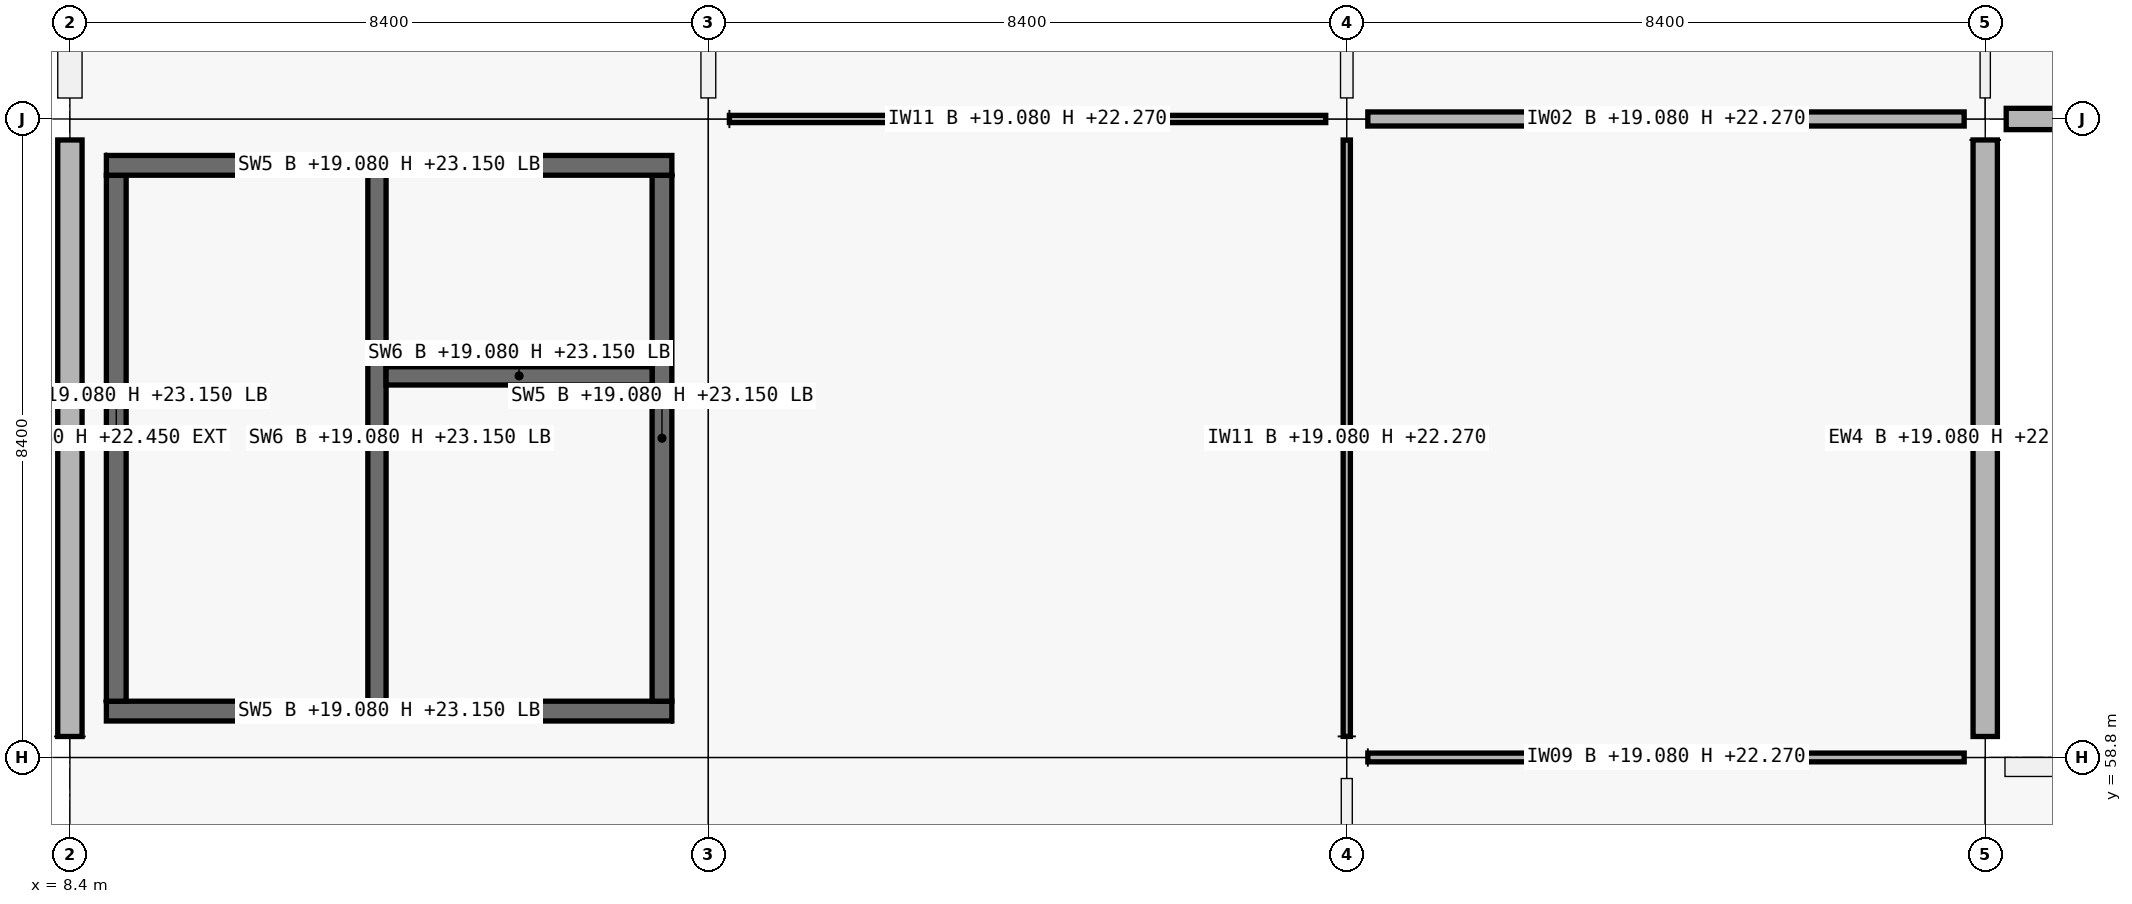
"""IFC4 building model, lengths in metres.
Left out: names, types, materials, properties, quantities, classifications, styles, units other than length and angle.
Written with IfcOpenShell. Run it as: python <this file> out.ifc"""

import sys

from ifc_helpers import new_model, si_unit, direction, frame, frame_2d, origin, origin_2d, place, context, subcontext, project, spatial, rectangle, i_section, extrude, element, fill, save


model = new_model("IFC4")
c1 = context("Model", 3, precision=1e-05, world=origin(), true_north=direction((0.0, 1.0)))
c2 = subcontext(c1, "Body", "Model", "MODEL_VIEW")
j1 = project(units=[si_unit("LENGTHUNIT", "METRE"), si_unit("PLANEANGLEUNIT", "RADIAN")], contexts=[c1])
p1 = place(None, origin())
s1 = spatial("IfcSite", under=j1, at=p1, CompositionType="ELEMENT")
p2 = place(p1, origin())
s2 = spatial("IfcBuilding", under=s1, at=p2, CompositionType="ELEMENT")
p3 = place(p2, frame((0.0, 0.0, 19.08)))
s3 = spatial("IfcBuildingStorey", under=s2, at=p3, CompositionType="ELEMENT", Elevation=19.08)
for number, where, z_axis, x_axis in (
    (1, (8.4, 58.8, 0.0), (0.0, 0.0, 1.0), (1.0, 0.0, 0.0)),
    (2, (8.4, 67.2, 0.0), (0.0, 0.0, 1.0), (1.0, 0.0, 0.0)),
    (3, (16.8, 58.8, 0.0), (0.0, 0.0, 1.0), (1.0, 0.0, 0.0)),
    (4, (16.8, 67.2, 0.0), (0.0, 0.0, 1.0), (1.0, 0.0, 0.0)),
    (5, (25.2, 58.8, 0.0), (0.0, 0.0, 1.0), (1.0, 0.0, 0.0)),
    (6, (25.2, 67.2, 0.0), (0.0, 0.0, 1.0), (1.0, 0.0, 0.0)),
    (7, (33.6, 58.8, 0.0), (0.0, 0.0, 1.0), (1.0, 0.0, 0.0)),
    (8, (33.6, 67.2, 0.0), (0.0, 0.0, 1.0), (1.0, 0.0, 0.0)),
):
    element("IfcColumn", number, at=place(p3, frame(where, z_axis=z_axis, x_axis=x_axis)), inside=s3, PredefinedType="COLUMN", context=c2, shape_type="SweptSolid", body=[
        extrude(rectangle(XDim=0.55, YDim=0.55, at=origin_2d()), origin(), (0.0, 0.0, 1.0), 4.16),
    ])
for number, where, z_axis, x_axis in (
    (9, (16.8, 58.8, 4.16), (0.0, 0.0, 1.0), (1.0, 0.0, 0.0)),
    (10, (25.2, 58.8, 4.16), (0.0, 0.0, 1.0), (1.0, 0.0, 0.0)),
    (11, (16.8, 67.2, 4.16), (0.0, 0.0, 1.0), (1.0, 0.0, 0.0)),
    (12, (25.2, 67.2, 4.16), (0.0, 0.0, 1.0), (1.0, 0.0, 0.0)),
):
    element("IfcColumn", number, at=place(p3, frame(where, z_axis=z_axis, x_axis=x_axis)), inside=s3, PredefinedType="COLUMN", context=c2, shape_type="SweptSolid", body=[
        extrude(i_section(OverallWidth=0.305, OverallDepth=0.308, WebThickness=0.01, FlangeThickness=0.015, FilletRadius=0.017, at=origin_2d()), origin(), (0.0, 0.0, 1.0), 1.925),
    ])
p4 = place(p3, frame((8.4, 59.076, 0.0), z_axis=(0.0, 0.0, 1.0), x_axis=(0.0, 1.0, 0.0)))
e13 = element("IfcWall", 13, at=p4, inside=s3, PredefinedType="SOLIDWALL", context=c2, shape_type="SweptSolid", body=[
    extrude(rectangle(XDim=7.848, YDim=0.32, at=frame_2d((3.924, 0.0))), origin(), (0.0, 0.0, 1.0), 3.37),
])
p5 = place(p3, frame((8.4, 67.476, 0.0), z_axis=(0.0, 0.0, 1.0), x_axis=(0.0, 1.0, 0.0)))
e14 = element("IfcWall", 14, at=p5, inside=s3, PredefinedType="SOLIDWALL", context=c2, shape_type="SweptSolid", body=[
    extrude(rectangle(XDim=7.848, YDim=0.32, at=frame_2d((3.924, 0.0))), origin(), (0.0, 0.0, 1.0), 3.37),
])
p6 = place(p3, frame((33.6, 66.924, 0.0), z_axis=(0.0, 0.0, 1.0), x_axis=(0.0, -1.0, 0.0)))
e15 = element("IfcWall", 15, at=p6, inside=s3, PredefinedType="SOLIDWALL", context=c2, shape_type="SweptSolid", body=[
    extrude(rectangle(XDim=7.848, YDim=0.32, at=frame_2d((3.924, 0.0))), origin(), (0.0, 0.0, 1.0), 3.37),
])
p7 = place(p6, frame((3.474, 0.0, 0.9)))
e16 = element("IfcOpeningElement", 16, at=p7, cuts=e15, PredefinedType="OPENING", context=c2, shape_type="SweptSolid", body=[
    extrude(rectangle(XDim=0.9, YDim=1.5, at=frame_2d((0.45, 0.75))), frame((0.0, 0.16, 0.0), z_axis=(0.0, -1.0, 0.0), x_axis=(1.0, 0.0, 0.0)), (0.0, 0.0, 1.0), 0.32),
])
p8 = place(p3, frame((41.724, 67.2, 0.0), z_axis=(0.0, 0.0, 1.0), x_axis=(-1.0, 0.0, 0.0)))
e17 = element("IfcWall", 17, at=p8, inside=s3, PredefinedType="SOLIDWALL", context=c2, shape_type="SweptSolid", body=[
    extrude(rectangle(XDim=7.848, YDim=0.28, at=frame_2d((3.924, 0.0))), origin(), (0.0, 0.0, 1.0), 3.37),
])
p9 = place(p8, frame((2.774, 0.0, 0.9)))
e18 = element("IfcOpeningElement", 18, at=p9, cuts=e17, PredefinedType="OPENING", context=c2, shape_type="SweptSolid", body=[
    extrude(rectangle(XDim=2.3, YDim=1.85, at=frame_2d((1.15, 0.925))), frame((0.0, 0.14, 0.0), z_axis=(0.0, -1.0, 0.0), x_axis=(1.0, 0.0, 0.0)), (0.0, 0.0, 1.0), 0.28),
])
p10 = place(p3, frame((33.86, 58.675, 0.0), z_axis=(0.0, 0.0, 1.0), x_axis=(1.0, 0.0, 0.0)))
e19 = element("IfcWall", 19, at=p10, inside=s3, PredefinedType="PARAPET", context=c2, shape_type="SweptSolid", body=[
    extrude(rectangle(XDim=7.88, YDim=0.25, at=frame_2d((3.94, 0.0))), origin(), (0.0, 0.0, 1.0), 0.95),
])
p11 = place(p3, frame((16.32, 59.41, 0.0), z_axis=(0.0, 0.0, 1.0), x_axis=(-1.0, 0.0, 0.0)))
e20 = element("IfcWall", 20, at=p11, inside=s3, PredefinedType="SHEAR", context=c2, shape_type="SweptSolid", body=[
    extrude(rectangle(XDim=7.44, YDim=0.26, at=frame_2d((3.72, 0.0))), origin(), (0.0, 0.0, 1.0), 4.07),
])
p12 = place(p11, frame((1.28, 0.0, 0.0)))
e21 = element("IfcOpeningElement", 21, at=p12, cuts=e20, PredefinedType="OPENING", context=c2, shape_type="SweptSolid", body=[
    extrude(rectangle(XDim=1.5, YDim=2.15, at=frame_2d((0.75, 1.075))), frame((0.0, 0.13, 0.0), z_axis=(0.0, -1.0, 0.0), x_axis=(1.0, 0.0, 0.0)), (0.0, 0.0, 1.0), 0.26),
])
p13 = place(p3, frame((9.01, 59.54, 0.0), z_axis=(0.0, 0.0, 1.0), x_axis=(0.0, 1.0, 0.0)))
e22 = element("IfcWall", 22, at=p13, inside=s3, PredefinedType="SHEAR", context=c2, shape_type="SweptSolid", body=[
    extrude(rectangle(XDim=6.92, YDim=0.26, at=frame_2d((3.46, 0.0))), origin(), (0.0, 0.0, 1.0), 4.07),
])
p14 = place(p3, frame((8.88, 66.59, 0.0), z_axis=(0.0, 0.0, 1.0), x_axis=(1.0, 0.0, 0.0)))
e23 = element("IfcWall", 23, at=p14, inside=s3, PredefinedType="SHEAR", context=c2, shape_type="SweptSolid", body=[
    extrude(rectangle(XDim=7.44, YDim=0.26, at=frame_2d((3.72, 0.0))), origin(), (0.0, 0.0, 1.0), 4.07),
])
p15 = place(p3, frame((16.19, 66.46, 0.0), z_axis=(0.0, 0.0, 1.0), x_axis=(0.0, -1.0, 0.0)))
e24 = element("IfcWall", 24, at=p15, inside=s3, PredefinedType="SHEAR", context=c2, shape_type="SweptSolid", body=[
    extrude(rectangle(XDim=6.92, YDim=0.26, at=frame_2d((3.46, 0.0))), origin(), (0.0, 0.0, 1.0), 4.07),
])
p16 = place(p3, frame((12.44, 59.54, 0.0), z_axis=(0.0, 0.0, 1.0), x_axis=(0.0, 1.0, 0.0)))
e25 = element("IfcWall", 25, at=p16, inside=s3, PredefinedType="SHEAR", context=c2, shape_type="SweptSolid", body=[
    extrude(rectangle(XDim=6.92, YDim=0.24, at=frame_2d((3.46, 0.0))), origin(), (0.0, 0.0, 1.0), 4.07),
])
p17 = place(p16, frame((0.12, 0.0, 0.0)))
e26 = element("IfcOpeningElement", 26, at=p17, cuts=e25, PredefinedType="OPENING", context=c2, shape_type="SweptSolid", body=[
    extrude(rectangle(XDim=1.0, YDim=2.15, at=frame_2d((0.5, 1.075))), frame((0.0, 0.12, 0.0), z_axis=(0.0, -1.0, 0.0), x_axis=(1.0, 0.0, 0.0)), (0.0, 0.0, 1.0), 0.24),
])
p18 = place(p3, frame((12.56, 63.82, 0.0), z_axis=(0.0, 0.0, 1.0), x_axis=(1.0, 0.0, 0.0)))
e27 = element("IfcWall", 27, at=p18, inside=s3, PredefinedType="SHEAR", context=c2, shape_type="SweptSolid", body=[
    extrude(rectangle(XDim=3.5, YDim=0.24, at=frame_2d((1.75, 0.0))), origin(), (0.0, 0.0, 1.0), 4.07),
])
p19 = place(p18, frame((1.2, 0.0, 0.0)))
e28 = element("IfcOpeningElement", 28, at=p19, cuts=e27, PredefinedType="OPENING", context=c2, shape_type="SweptSolid", body=[
    extrude(rectangle(XDim=1.1, YDim=2.15, at=frame_2d((0.55, 1.075))), frame((0.0, 0.12, 0.0), z_axis=(0.0, -1.0, 0.0), x_axis=(1.0, 0.0, 0.0)), (0.0, 0.0, 1.0), 0.24),
])
p20 = place(p3, frame((17.077, 67.2, 0.0), z_axis=(0.0, 0.0, 1.0), x_axis=(1.0, 0.0, 0.0)))
e29 = element("IfcWall", 29, at=p20, inside=s3, PredefinedType="PARTITIONING", context=c2, shape_type="SweptSolid", body=[
    extrude(rectangle(XDim=7.846, YDim=0.095, at=frame_2d((3.923, 0.0))), origin(), (0.0, 0.0, 1.0), 3.19),
])
p21 = place(p20, frame((3.458, 0.0, 0.0)))
e30 = element("IfcOpeningElement", 30, at=p21, cuts=e29, PredefinedType="OPENING", context=c2, shape_type="SweptSolid", body=[
    extrude(rectangle(XDim=0.93, YDim=2.12, at=frame_2d((0.465, 1.06))), frame((0.0, 0.047, 0.0), z_axis=(0.0, -1.0, 0.0), x_axis=(1.0, 0.0, 0.0)), (0.0, 0.0, 1.0), 0.095),
])
p22 = place(p3, frame((25.477, 58.8, 0.0), z_axis=(0.0, 0.0, 1.0), x_axis=(1.0, 0.0, 0.0)))
e31 = element("IfcWall", 31, at=p22, inside=s3, PredefinedType="PARTITIONING", context=c2, shape_type="SweptSolid", body=[
    extrude(rectangle(XDim=7.846, YDim=0.115, at=frame_2d((3.923, 0.0))), origin(), (0.0, 0.0, 1.0), 3.19),
])
p23 = place(p22, frame((3.443, 0.0, 0.0)))
e32 = element("IfcOpeningElement", 32, at=p23, cuts=e31, PredefinedType="OPENING", context=c2, shape_type="SweptSolid", body=[
    extrude(rectangle(XDim=0.96, YDim=2.18, at=frame_2d((0.48, 1.09))), frame((0.0, 0.058, 0.0), z_axis=(0.0, -1.0, 0.0), x_axis=(1.0, 0.0, 0.0)), (0.0, 0.0, 1.0), 0.115),
])
p24 = place(p3, frame((25.477, 67.2, 0.0), z_axis=(0.0, 0.0, 1.0), x_axis=(1.0, 0.0, 0.0)))
e33 = element("IfcWall", 33, at=p24, inside=s3, PredefinedType="PARTITIONING", context=c2, shape_type="SweptSolid", body=[
    extrude(rectangle(XDim=7.846, YDim=0.185, at=frame_2d((3.923, 0.0))), origin(), (0.0, 0.0, 1.0), 3.19),
])
p25 = place(p24, frame((3.453, 0.0, 0.0)))
e34 = element("IfcOpeningElement", 34, at=p25, cuts=e33, PredefinedType="OPENING", context=c2, shape_type="SweptSolid", body=[
    extrude(rectangle(XDim=0.94, YDim=2.15, at=frame_2d((0.47, 1.075))), frame((0.0, 0.093, 0.0), z_axis=(0.0, -1.0, 0.0), x_axis=(1.0, 0.0, 0.0)), (0.0, 0.0, 1.0), 0.185),
])
p26 = place(p3, frame((16.8, 67.477, 0.0), z_axis=(0.0, 0.0, 1.0), x_axis=(0.0, 1.0, 0.0)))
e35 = element("IfcWall", 35, at=p26, inside=s3, PredefinedType="PARTITIONING", context=c2, shape_type="SweptSolid", body=[
    extrude(rectangle(XDim=7.846, YDim=0.195, at=frame_2d((3.923, 0.0))), origin(), (0.0, 0.0, 1.0), 3.19),
])
p27 = place(p26, frame((3.403, 0.0, 0.0)))
e36 = element("IfcOpeningElement", 36, at=p27, cuts=e35, PredefinedType="OPENING", context=c2, shape_type="SweptSolid", body=[
    extrude(rectangle(XDim=1.04, YDim=2.2, at=frame_2d((0.52, 1.1))), frame((0.0, 0.098, 0.0), z_axis=(0.0, -1.0, 0.0), x_axis=(1.0, 0.0, 0.0)), (0.0, 0.0, 1.0), 0.195),
])
p28 = place(p3, frame((25.2, 50.677, 0.0), z_axis=(0.0, 0.0, 1.0), x_axis=(0.0, 1.0, 0.0)))
e37 = element("IfcWall", 37, at=p28, inside=s3, PredefinedType="PARTITIONING", context=c2, shape_type="SweptSolid", body=[
    extrude(rectangle(XDim=7.846, YDim=0.145, at=frame_2d((3.923, 0.0))), origin(), (0.0, 0.0, 1.0), 3.19),
])
p29 = place(p28, frame((3.423, 0.0, 0.0)))
e38 = element("IfcOpeningElement", 38, at=p29, cuts=e37, PredefinedType="OPENING", context=c2, shape_type="SweptSolid", body=[
    extrude(rectangle(XDim=1.0, YDim=2.2, at=frame_2d((0.5, 1.1))), frame((0.0, 0.073, 0.0), z_axis=(0.0, -1.0, 0.0), x_axis=(1.0, 0.0, 0.0)), (0.0, 0.0, 1.0), 0.145),
])
p30 = place(p3, frame((25.2, 59.077, 0.0), z_axis=(0.0, 0.0, 1.0), x_axis=(0.0, 1.0, 0.0)))
e39 = element("IfcWall", 39, at=p30, inside=s3, PredefinedType="PARTITIONING", context=c2, shape_type="SweptSolid", body=[
    extrude(rectangle(XDim=7.846, YDim=0.095, at=frame_2d((3.923, 0.0))), origin(), (0.0, 0.0, 1.0), 3.19),
])
p31 = place(p30, frame((3.433, 0.0, 0.0)))
e40 = element("IfcOpeningElement", 40, at=p31, cuts=e39, PredefinedType="OPENING", context=c2, shape_type="SweptSolid", body=[
    extrude(rectangle(XDim=0.98, YDim=2.18, at=frame_2d((0.49, 1.09))), frame((0.0, 0.047, 0.0), z_axis=(0.0, -1.0, 0.0), x_axis=(1.0, 0.0, 0.0)), (0.0, 0.0, 1.0), 0.095),
])
p32 = place(p3, frame((25.2, 67.477, 0.0), z_axis=(0.0, 0.0, 1.0), x_axis=(0.0, 1.0, 0.0)))
e41 = element("IfcWall", 41, at=p32, inside=s3, PredefinedType="PARTITIONING", context=c2, shape_type="SweptSolid", body=[
    extrude(rectangle(XDim=7.846, YDim=0.165, at=frame_2d((3.923, 0.0))), origin(), (0.0, 0.0, 1.0), 3.19),
])
p33 = place(p32, frame((3.438, 0.0, 0.0)))
e42 = element("IfcOpeningElement", 42, at=p33, cuts=e41, PredefinedType="OPENING", context=c2, shape_type="SweptSolid", body=[
    extrude(rectangle(XDim=0.97, YDim=2.12, at=frame_2d((0.485, 1.06))), frame((0.0, 0.083, 0.0), z_axis=(0.0, -1.0, 0.0), x_axis=(1.0, 0.0, 0.0)), (0.0, 0.0, 1.0), 0.165),
])
p34 = place(p3, frame((33.6, 67.477, 0.0), z_axis=(0.0, 0.0, 1.0), x_axis=(0.0, 1.0, 0.0)))
e43 = element("IfcWall", 43, at=p34, inside=s3, PredefinedType="PARTITIONING", context=c2, shape_type="SweptSolid", body=[
    extrude(rectangle(XDim=7.846, YDim=0.135, at=frame_2d((3.923, 0.0))), origin(), (0.0, 0.0, 1.0), 3.19),
])
p35 = place(p34, frame((3.443, 0.0, 0.0)))
e44 = element("IfcOpeningElement", 44, at=p35, cuts=e43, PredefinedType="OPENING", context=c2, shape_type="SweptSolid", body=[
    extrude(rectangle(XDim=0.96, YDim=2.18, at=frame_2d((0.48, 1.09))), frame((0.0, 0.067, 0.0), z_axis=(0.0, -1.0, 0.0), x_axis=(1.0, 0.0, 0.0)), (0.0, 0.0, 1.0), 0.135),
])
p36 = place(p7, origin())
e45 = element("IfcWindow", 45, at=p36, inside=s3, PartitioningType="SINGLE_PANEL", PredefinedType="WINDOW", context=c2, shape_type="SweptSolid", body=[
    extrude(rectangle(XDim=0.9, YDim=1.5, at=frame_2d((0.45, 0.75))), frame((0.0, 0.03, 0.0), z_axis=(0.0, -1.0, 0.0), x_axis=(1.0, 0.0, 0.0)), (0.0, 0.0, 1.0), 0.06),
])
fill(e16, e45)
p37 = place(p17, origin())
e46 = element("IfcDoor", 46, at=p37, inside=s3, OperationType="SINGLE_SWING_LEFT", PredefinedType="DOOR", context=c2, shape_type="SweptSolid", body=[
    extrude(rectangle(XDim=1.0, YDim=2.15, at=frame_2d((0.5, 1.075))), frame((0.0, 0.025, 0.0), z_axis=(0.0, -1.0, 0.0), x_axis=(1.0, 0.0, 0.0)), (0.0, 0.0, 1.0), 0.05),
])
fill(e26, e46)
p38 = place(p12, origin())
e47 = element("IfcDoor", 47, at=p38, inside=s3, OperationType="DOUBLE_DOOR_SINGLE_SWING", PredefinedType="DOOR", context=c2, shape_type="SweptSolid", body=[
    extrude(rectangle(XDim=1.5, YDim=2.15, at=frame_2d((0.75, 1.075))), frame((0.0, 0.025, 0.0), z_axis=(0.0, -1.0, 0.0), x_axis=(1.0, 0.0, 0.0)), (0.0, 0.0, 1.0), 0.05),
])
fill(e21, e47)
p39 = place(p19, origin())
e48 = element("IfcDoor", 48, at=p39, inside=s3, OperationType="DOUBLE_DOOR_SLIDING", PredefinedType="DOOR", context=c2, shape_type="SweptSolid", body=[
    extrude(rectangle(XDim=1.1, YDim=2.15, at=frame_2d((0.55, 1.075))), frame((0.0, 0.025, 0.0), z_axis=(0.0, -1.0, 0.0), x_axis=(1.0, 0.0, 0.0)), (0.0, 0.0, 1.0), 0.05),
])
fill(e28, e48)
p40 = place(p21, origin())
e49 = element("IfcDoor", 49, at=p40, inside=s3, OperationType="SINGLE_SWING_LEFT", PredefinedType="DOOR", context=c2, shape_type="SweptSolid", body=[
    extrude(rectangle(XDim=0.93, YDim=2.12, at=frame_2d((0.465, 1.06))), frame((0.0, 0.025, 0.0), z_axis=(0.0, -1.0, 0.0), x_axis=(1.0, 0.0, 0.0)), (0.0, 0.0, 1.0), 0.05),
])
fill(e30, e49)
p41 = place(p31, origin())
e50 = element("IfcDoor", 50, at=p41, inside=s3, OperationType="SINGLE_SWING_LEFT", PredefinedType="DOOR", context=c2, shape_type="SweptSolid", body=[
    extrude(rectangle(XDim=0.98, YDim=2.18, at=frame_2d((0.49, 1.09))), frame((0.0, 0.025, 0.0), z_axis=(0.0, -1.0, 0.0), x_axis=(1.0, 0.0, 0.0)), (0.0, 0.0, 1.0), 0.05),
])
fill(e40, e50)
p42 = place(p23, origin())
e51 = element("IfcDoor", 51, at=p42, inside=s3, OperationType="SINGLE_SWING_LEFT", PredefinedType="DOOR", context=c2, shape_type="SweptSolid", body=[
    extrude(rectangle(XDim=0.96, YDim=2.18, at=frame_2d((0.48, 1.09))), frame((0.0, 0.025, 0.0), z_axis=(0.0, -1.0, 0.0), x_axis=(1.0, 0.0, 0.0)), (0.0, 0.0, 1.0), 0.05),
])
fill(e32, e51)
p43 = place(p25, origin())
e52 = element("IfcDoor", 52, at=p43, inside=s3, OperationType="SINGLE_SWING_RIGHT", PredefinedType="DOOR", context=c2, shape_type="SweptSolid", body=[
    extrude(rectangle(XDim=0.94, YDim=2.15, at=frame_2d((0.47, 1.075))), frame((0.0, 0.025, 0.0), z_axis=(0.0, -1.0, 0.0), x_axis=(1.0, 0.0, 0.0)), (0.0, 0.0, 1.0), 0.05),
])
fill(e34, e52)
save(model, sys.argv[1])
